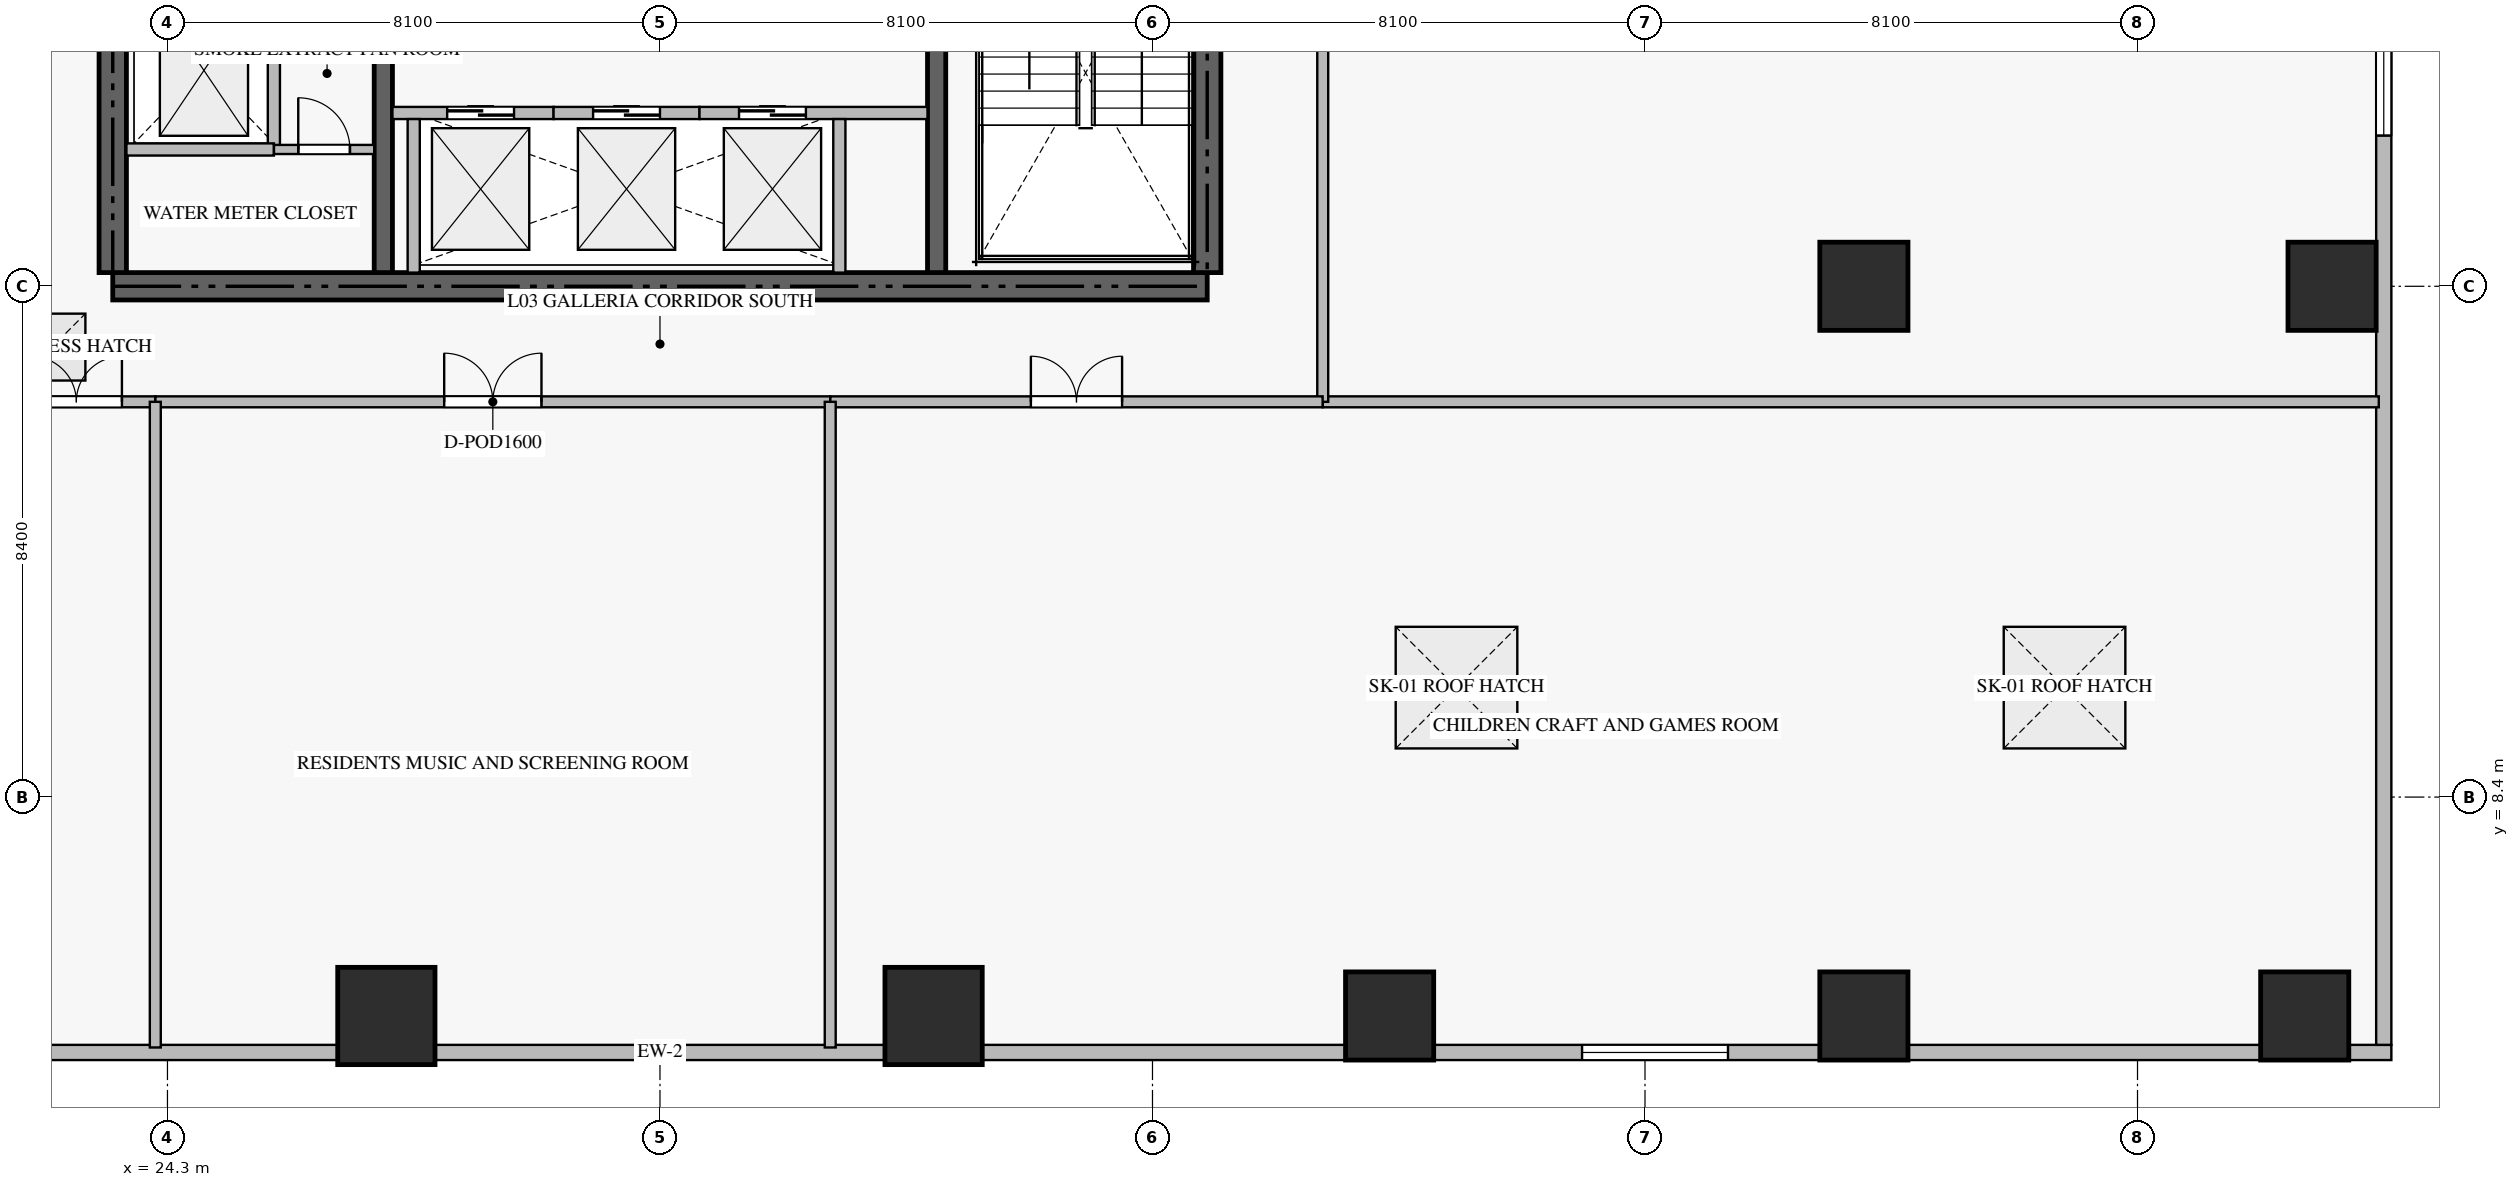
"""IFC4 building model, lengths in metres.
Left out: names, types, materials, properties, quantities, classifications, styles, units other than length and angle.
Written with IfcOpenShell. Run it as: python <this file> out.ifc"""

import sys

from ifc_helpers import new_model, si_unit, direction, frame, frame_2d, origin, origin_2d, place, context, subcontext, project, spatial, rectangle, extrude, source, transform, mapped, element, fill, save


model = new_model("IFC4")
c1 = context("Model", 3, precision=1e-05, world=origin(), true_north=direction((0.0, 1.0)))
c2 = subcontext(c1, "Body", "Model", "MODEL_VIEW")
j1 = project(units=[si_unit("LENGTHUNIT", "METRE"), si_unit("PLANEANGLEUNIT", "RADIAN")], contexts=[c1])
p1 = place(None, origin())
s1 = spatial("IfcSite", under=j1, at=p1, CompositionType="ELEMENT")
p2 = place(p1, origin())
s2 = spatial("IfcBuilding", under=s1, at=p2, CompositionType="ELEMENT")
p3 = place(p2, frame((0.0, 0.0, 15.3)))
s3 = spatial("IfcBuildingStorey", under=s2, at=p3, CompositionType="ELEMENT", Elevation=15.3)
p4 = place(p3, frame((23.4, 16.8, -0.38), z_axis=(0.0, 0.0, 1.0), x_axis=(1.0, 0.0, 0.0)))
e1 = element("IfcWall", 1, at=p4, inside=s3, PredefinedType="SHEAR", context=c2, shape_type="SweptSolid", body=[
    extrude(rectangle(XDim=18.0, YDim=0.45, at=frame_2d((9.0, 0.0))), origin(), (0.0, 0.0, 1.0), 5.228),
])
p5 = place(p3, frame((23.4, 17.025, -0.38), z_axis=(0.0, 0.0, 1.0), x_axis=(0.0, 1.0, 0.0)))
e2 = element("IfcWall", 2, at=p5, inside=s3, PredefinedType="SHEAR", context=c2, shape_type="SweptSolid", body=[
    extrude(rectangle(XDim=4.825, YDim=0.45, at=frame_2d((2.413, 0.0))), origin(), (0.0, 0.0, 1.0), 5.228),
])
p6 = place(p3, frame((41.4, 17.025, -0.38), z_axis=(0.0, 0.0, 1.0), x_axis=(0.0, 1.0, 0.0)))
e3 = element("IfcWall", 3, at=p6, inside=s3, PredefinedType="SHEAR", context=c2, shape_type="SweptSolid", body=[
    extrude(rectangle(XDim=8.325, YDim=0.45, at=frame_2d((4.163, 0.0))), origin(), (0.0, 0.0, 1.0), 5.228),
])
p7 = place(p3, frame((27.85, 17.025, -0.38), z_axis=(0.0, 0.0, 1.0), x_axis=(0.0, 1.0, 0.0)))
e4 = element("IfcWall", 4, at=p7, inside=s3, PredefinedType="SHEAR", context=c2, shape_type="SweptSolid", body=[
    extrude(rectangle(XDim=4.825, YDim=0.3, at=frame_2d((2.413, 0.0))), origin(), (0.0, 0.0, 1.0), 5.228),
])
p8 = place(p3, frame((36.95, 17.025, -0.38), z_axis=(0.0, 0.0, 1.0), x_axis=(0.0, 1.0, 0.0)))
e5 = element("IfcWall", 5, at=p8, inside=s3, PredefinedType="SHEAR", context=c2, shape_type="SweptSolid", body=[
    extrude(rectangle(XDim=8.325, YDim=0.3, at=frame_2d((4.163, 0.0))), origin(), (0.0, 0.0, 1.0), 5.228),
])
m1 = source(origin(), c2, "Body", "SweptSolid", [
    extrude(rectangle(XDim=1.6, YDim=1.6, at=origin_2d()), origin(), (0.0, 0.0, 1.0), 5.23),
])
for number, where, z_axis, x_axis in (
    (6, (27.9, 4.8, -0.38), (0.0, 0.0, 1.0), (1.0, 0.0, 0.0)),
    (7, (36.9, 4.8, -0.38), (0.0, 0.0, 1.0), (1.0, 0.0, 0.0)),
):
    element("IfcColumn", number, at=place(p3, frame(where, z_axis=z_axis, x_axis=x_axis)), inside=s3, PredefinedType="COLUMN", context=c2, shape_type="MappedRepresentation", body=[
        mapped(m1, transform((0.0, 0.0, 0.0), scale=1.0)),
    ])
m2 = source(origin(), c2, "Body", "SweptSolid", [
    extrude(rectangle(XDim=1.45, YDim=1.45, at=origin_2d()), origin(), (0.0, 0.0, 1.0), 5.23),
])
for number, where, z_axis, x_axis in (
    (8, (44.4, 4.8, -0.38), (0.0, 0.0, 1.0), (1.0, 0.0, 0.0)),
    (9, (52.2, 4.8, -0.38), (0.0, 0.0, 1.0), (1.0, 0.0, 0.0)),
    (10, (52.2, 16.8, -0.38), (0.0, 0.0, 1.0), (1.0, 0.0, 0.0)),
    (11, (59.9, 16.8, -0.38), (0.0, 0.0, 1.0), (1.0, 0.0, 0.0)),
    (12, (59.45, 4.8, -0.38), (0.0, 0.0, 1.0), (1.0, 0.0, 0.0)),
):
    element("IfcColumn", number, at=place(p3, frame(where, z_axis=z_axis, x_axis=x_axis)), inside=s3, PredefinedType="COLUMN", context=c2, shape_type="MappedRepresentation", body=[
        mapped(m2, transform((0.0, 0.0, 0.0), scale=1.0)),
    ])
p9 = place(p3, frame((3.925, 4.2, 0.0), z_axis=(0.0, 0.0, 1.0), x_axis=(1.0, 0.0, 0.0)))
e13 = element("IfcWall", 13, at=p9, inside=s3, PredefinedType="ELEMENTEDWALL", context=c2, shape_type="SweptSolid", body=[
    extrude(rectangle(XDim=56.95, YDim=0.25, at=frame_2d((28.475, 0.0))), origin(), (0.0, 0.0, 1.0), 4.835),
])
p10 = place(p9, frame((10.91, 0.0, 0.6)))
e14 = element("IfcOpeningElement", 14, at=p10, cuts=e13, PredefinedType="OPENING", context=c2, shape_type="SweptSolid", body=[
    extrude(rectangle(XDim=2.4, YDim=2.6, at=frame_2d((1.2, 1.3))), frame((0.0, 0.135, 0.0), z_axis=(0.0, -1.0, 0.0), x_axis=(1.0, 0.0, 0.0)), (0.0, 0.0, 1.0), 0.27),
])
p11 = place(p9, frame((43.64, 0.0, 0.6)))
e15 = element("IfcOpeningElement", 15, at=p11, cuts=e13, PredefinedType="OPENING", context=c2, shape_type="SweptSolid", body=[
    extrude(rectangle(XDim=2.4, YDim=2.6, at=frame_2d((1.2, 1.3))), frame((0.0, 0.135, 0.0), z_axis=(0.0, -1.0, 0.0), x_axis=(1.0, 0.0, 0.0)), (0.0, 0.0, 1.0), 0.27),
])
p12 = place(p3, frame((60.75, 4.325, 0.0), z_axis=(0.0, 0.0, 1.0), x_axis=(0.0, 1.0, 0.0)))
e16 = element("IfcWall", 16, at=p12, inside=s3, PredefinedType="ELEMENTEDWALL", context=c2, shape_type="SweptSolid", body=[
    extrude(rectangle(XDim=41.75, YDim=0.25, at=frame_2d((20.875, 0.0))), origin(), (0.0, 0.0, 1.0), 4.835),
])
p13 = place(p12, frame((14.953, 0.0, 0.6)))
e17 = element("IfcOpeningElement", 17, at=p13, cuts=e16, PredefinedType="OPENING", context=c2, shape_type="SweptSolid", body=[
    extrude(rectangle(XDim=2.4, YDim=2.6, at=frame_2d((1.2, 1.3))), frame((0.0, 0.135, 0.0), z_axis=(0.0, -1.0, 0.0), x_axis=(1.0, 0.0, 0.0)), (0.0, 0.0, 1.0), 0.27),
])
p14 = place(p12, frame((24.397, 0.0, 0.6)))
e18 = element("IfcOpeningElement", 18, at=p14, cuts=e16, PredefinedType="OPENING", context=c2, shape_type="SweptSolid", body=[
    extrude(rectangle(XDim=2.4, YDim=2.6, at=frame_2d((1.2, 1.3))), frame((0.0, 0.135, 0.0), z_axis=(0.0, -1.0, 0.0), x_axis=(1.0, 0.0, 0.0)), (0.0, 0.0, 1.0), 0.27),
])
p15 = place(p3, frame((28.0, 19.65, 0.0), z_axis=(0.0, 0.0, 1.0), x_axis=(1.0, 0.0, 0.0)))
e19 = element("IfcWall", 19, at=p15, inside=s3, PredefinedType="STANDARD", context=c2, shape_type="SweptSolid", body=[
    extrude(rectangle(XDim=2.65, YDim=0.2, at=frame_2d((1.325, 0.0))), origin(), (0.0, 0.0, 1.0), 4.85),
])
p16 = place(p15, frame((0.9, 0.0, 0.0)))
e20 = element("IfcOpeningElement", 20, at=p16, cuts=e19, PredefinedType="OPENING", context=c2, shape_type="SweptSolid", body=[
    extrude(rectangle(XDim=1.1, YDim=2.2, at=frame_2d((0.55, 1.1))), frame((0.0, 0.11, 0.0), z_axis=(0.0, -1.0, 0.0), x_axis=(1.0, 0.0, 0.0)), (0.0, 0.0, 1.0), 0.22),
])
p17 = place(p3, frame((28.35, 17.025, 0.0), z_axis=(0.0, 0.0, 1.0), x_axis=(0.0, 1.0, 0.0)))
e21 = element("IfcWall", 21, at=p17, inside=s3, PredefinedType="STANDARD", context=c2, shape_type="SweptSolid", body=[
    extrude(rectangle(XDim=2.525, YDim=0.2, at=frame_2d((1.263, 0.0))), origin(), (0.0, 0.0, 1.0), 4.85),
])
p18 = place(p3, frame((30.65, 19.65, 0.0), z_axis=(0.0, 0.0, 1.0), x_axis=(1.0, 0.0, 0.0)))
e22 = element("IfcWall", 22, at=p18, inside=s3, PredefinedType="STANDARD", context=c2, shape_type="SweptSolid", body=[
    extrude(rectangle(XDim=2.4, YDim=0.2, at=frame_2d((1.2, 0.0))), origin(), (0.0, 0.0, 1.0), 4.85),
])
p19 = place(p18, frame((0.65, 0.0, 0.0)))
e23 = element("IfcOpeningElement", 23, at=p19, cuts=e22, PredefinedType="OPENING", context=c2, shape_type="SweptSolid", body=[
    extrude(rectangle(XDim=1.1, YDim=2.2, at=frame_2d((0.55, 1.1))), frame((0.0, 0.11, 0.0), z_axis=(0.0, -1.0, 0.0), x_axis=(1.0, 0.0, 0.0)), (0.0, 0.0, 1.0), 0.22),
])
p20 = place(p3, frame((33.05, 19.65, 0.0), z_axis=(0.0, 0.0, 1.0), x_axis=(1.0, 0.0, 0.0)))
e24 = element("IfcWall", 24, at=p20, inside=s3, PredefinedType="STANDARD", context=c2, shape_type="SweptSolid", body=[
    extrude(rectangle(XDim=3.75, YDim=0.2, at=frame_2d((1.875, 0.0))), origin(), (0.0, 0.0, 1.0), 4.85),
])
p21 = place(p20, frame((0.65, 0.0, 0.0)))
e25 = element("IfcOpeningElement", 25, at=p21, cuts=e24, PredefinedType="OPENING", context=c2, shape_type="SweptSolid", body=[
    extrude(rectangle(XDim=1.1, YDim=2.2, at=frame_2d((0.55, 1.1))), frame((0.0, 0.11, 0.0), z_axis=(0.0, -1.0, 0.0), x_axis=(1.0, 0.0, 0.0)), (0.0, 0.0, 1.0), 0.22),
])
p22 = place(p3, frame((35.35, 17.025, 0.0), z_axis=(0.0, 0.0, 1.0), x_axis=(0.0, 1.0, 0.0)))
e26 = element("IfcWall", 26, at=p22, inside=s3, PredefinedType="STANDARD", context=c2, shape_type="SweptSolid", body=[
    extrude(rectangle(XDim=2.525, YDim=0.2, at=frame_2d((1.263, 0.0))), origin(), (0.0, 0.0, 1.0), 4.85),
])
p23 = place(p3, frame((26.05, 19.05, 0.0), z_axis=(0.0, 0.0, 1.0), x_axis=(0.0, 1.0, 0.0)))
e27 = element("IfcWall", 27, at=p23, inside=s3, PredefinedType="STANDARD", context=c2, shape_type="SweptSolid", body=[
    extrude(rectangle(XDim=2.5, YDim=0.2, at=frame_2d((1.25, 0.0))), origin(), (0.0, 0.0, 1.0), 4.85),
])
p24 = place(p3, frame((23.625, 19.05, 0.0), z_axis=(0.0, 0.0, 1.0), x_axis=(1.0, 0.0, 0.0)))
e28 = element("IfcWall", 28, at=p24, inside=s3, PredefinedType="STANDARD", context=c2, shape_type="SweptSolid", body=[
    extrude(rectangle(XDim=2.425, YDim=0.2, at=frame_2d((1.212, 0.0))), origin(), (0.0, 0.0, 1.0), 4.85),
])
p25 = place(p3, frame((26.052, 19.05, 0.0), z_axis=(0.0, 0.0, 1.0), x_axis=(1.0, 0.0, 0.0)))
e29 = element("IfcWall", 29, at=p25, inside=s3, PredefinedType="PARTITIONING", context=c2, shape_type="SweptSolid", body=[
    extrude(rectangle(XDim=1.648, YDim=0.15, at=frame_2d((0.824, 0.0))), origin(), (0.0, 0.0, 1.0), 4.85),
])
p26 = place(p25, frame((0.399, 0.0, 0.0)))
e30 = element("IfcOpeningElement", 30, at=p26, cuts=e29, PredefinedType="OPENING", context=c2, shape_type="SweptSolid", body=[
    extrude(rectangle(XDim=0.85, YDim=2.1, at=frame_2d((0.425, 1.05))), frame((0.0, 0.085, 0.0), z_axis=(0.0, -1.0, 0.0), x_axis=(1.0, 0.0, 0.0)), (0.0, 0.0, 1.0), 0.17),
])
p27 = place(p3, frame((43.3, 14.9, 0.0), z_axis=(0.0, 0.0, 1.0), x_axis=(1.0, 0.0, 0.0)))
e31 = element("IfcWall", 31, at=p27, inside=s3, PredefinedType="PARTITIONING", context=c2, shape_type="SweptSolid", body=[
    extrude(rectangle(XDim=17.368, YDim=0.18, at=frame_2d((8.684, 0.0))), origin(), (0.0, 0.0, 1.0), 4.85),
])
p28 = place(p3, frame((43.3, 14.9, 0.0), z_axis=(0.0, 0.0, 1.0), x_axis=(0.0, 1.0, 0.0)))
e32 = element("IfcWall", 32, at=p28, inside=s3, PredefinedType="PARTITIONING", context=c2, shape_type="SweptSolid", body=[
    extrude(rectangle(XDim=18.18, YDim=0.18, at=frame_2d((9.09, 0.0))), origin(), (0.0, 0.0, 1.0), 4.85),
])
p29 = place(p28, frame((8.34, 0.0, 0.0)))
e33 = element("IfcOpeningElement", 33, at=p29, cuts=e32, PredefinedType="OPENING", context=c2, shape_type="SweptSolid", body=[
    extrude(rectangle(XDim=1.5, YDim=2.25, at=frame_2d((0.75, 1.125))), frame((0.0, 0.1, 0.0), z_axis=(0.0, -1.0, 0.0), x_axis=(1.0, 0.0, 0.0)), (0.0, 0.0, 1.0), 0.2),
])
p30 = place(p3, frame((21.502, 14.9, 0.0), z_axis=(0.0, 0.0, 1.0), x_axis=(1.0, 0.0, 0.0)))
e34 = element("IfcWall", 34, at=p30, inside=s3, PredefinedType="PARTITIONING", context=c2, shape_type="SweptSolid", body=[
    extrude(rectangle(XDim=2.598, YDim=0.18, at=frame_2d((1.299, 0.0))), origin(), (0.0, 0.0, 1.0), 4.85),
])
p31 = place(p30, frame((0.549, 0.0, 0.0)))
e35 = element("IfcOpeningElement", 35, at=p31, cuts=e34, PredefinedType="OPENING", context=c2, shape_type="SweptSolid", body=[
    extrude(rectangle(XDim=1.5, YDim=2.25, at=frame_2d((0.75, 1.125))), frame((0.0, 0.1, 0.0), z_axis=(0.0, -1.0, 0.0), x_axis=(1.0, 0.0, 0.0)), (0.0, 0.0, 1.0), 0.2),
])
p32 = place(p3, frame((24.102, 14.9, 0.0), z_axis=(0.0, 0.0, 1.0), x_axis=(1.0, 0.0, 0.0)))
e36 = element("IfcWall", 36, at=p32, inside=s3, PredefinedType="PARTITIONING", context=c2, shape_type="SweptSolid", body=[
    extrude(rectangle(XDim=11.098, YDim=0.18, at=frame_2d((5.549, 0.0))), origin(), (0.0, 0.0, 1.0), 4.85),
])
p33 = place(p32, frame((4.749, 0.0, 0.0)))
e37 = element("IfcOpeningElement", 37, at=p33, cuts=e36, PredefinedType="OPENING", context=c2, shape_type="SweptSolid", body=[
    extrude(rectangle(XDim=1.6, YDim=2.3, at=frame_2d((0.8, 1.15))), frame((0.0, 0.1, 0.0), z_axis=(0.0, -1.0, 0.0), x_axis=(1.0, 0.0, 0.0)), (0.0, 0.0, 1.0), 0.2),
])
p34 = place(p3, frame((35.202, 14.9, 0.0), z_axis=(0.0, 0.0, 1.0), x_axis=(1.0, 0.0, 0.0)))
e38 = element("IfcWall", 38, at=p34, inside=s3, PredefinedType="PARTITIONING", context=c2, shape_type="SweptSolid", body=[
    extrude(rectangle(XDim=8.096, YDim=0.18, at=frame_2d((4.048, 0.0))), origin(), (0.0, 0.0, 1.0), 4.85),
])
p35 = place(p34, frame((3.298, 0.0, 0.0)))
e39 = element("IfcOpeningElement", 39, at=p35, cuts=e38, PredefinedType="OPENING", context=c2, shape_type="SweptSolid", body=[
    extrude(rectangle(XDim=1.5, YDim=2.25, at=frame_2d((0.75, 1.125))), frame((0.0, 0.1, 0.0), z_axis=(0.0, -1.0, 0.0), x_axis=(1.0, 0.0, 0.0)), (0.0, 0.0, 1.0), 0.2),
])
for number, where, z_axis, x_axis in (
    (40, (24.1, 4.282, 0.0), (0.0, 0.0, 1.0), (0.0, 1.0, 0.0)),
    (41, (35.2, 4.282, 0.0), (0.0, 0.0, 1.0), (0.0, 1.0, 0.0)),
):
    element("IfcWall", number, at=place(p3, frame(where, z_axis=z_axis, x_axis=x_axis)), inside=s3, PredefinedType="PARTITIONING", context=c2, shape_type="SweptSolid", body=[
        extrude(rectangle(XDim=10.618, YDim=0.18, at=frame_2d((5.309, 0.0))), origin(), (0.0, 0.0, 1.0), 4.85),
    ])
m3 = source(origin(), c2, "Body", "SweptSolid", [
    extrude(rectangle(XDim=2.4, YDim=2.6, at=frame_2d((1.2, 1.3))), frame((0.0, 0.03, 0.0), z_axis=(0.0, -1.0, 0.0), x_axis=(1.0, 0.0, 0.0)), (0.0, 0.0, 1.0), 0.06),
])
p36 = place(p11, origin())
e42 = element("IfcWindow", 42, at=p36, inside=s3, PartitioningType="SINGLE_PANEL", PredefinedType="WINDOW", context=c2, shape_type="MappedRepresentation", body=[
    mapped(m3, transform((0.0, 0.0, 0.0), scale=1.0)),
])
fill(e15, e42)
p37 = place(p13, origin())
e43 = element("IfcWindow", 43, at=p37, inside=s3, PartitioningType="SINGLE_PANEL", PredefinedType="WINDOW", context=c2, shape_type="MappedRepresentation", body=[
    mapped(m3, transform((0.0, 0.0, 0.0), scale=1.0)),
])
fill(e17, e43)
p38 = place(p3, frame((0.0, 0.0, -0.38)))
p39 = place(p38, frame((45.5, 10.2, 0.0)))
p40 = place(p39, frame((0.0, 0.0, 0.34)))
e44 = element("IfcWindow", 44, at=p40, inside=s3, PartitioningType="SINGLE_PANEL", PredefinedType="SKYLIGHT", context=c2, shape_type="SweptSolid", body=[
    extrude(rectangle(XDim=2.0, YDim=2.0, at=origin_2d()), origin(), (0.0, 0.0, 1.0), 0.04),
])
p41 = place(p38, frame((55.5, 10.2, 0.0)))
p42 = place(p41, frame((0.0, 0.0, 0.34)))
e45 = element("IfcWindow", 45, at=p42, inside=s3, PartitioningType="SINGLE_PANEL", PredefinedType="SKYLIGHT", context=c2, shape_type="SweptSolid", body=[
    extrude(rectangle(XDim=2.0, YDim=2.0, at=origin_2d()), origin(), (0.0, 0.0, 1.0), 0.04),
])
p43 = place(p2, frame((0.0, 0.0, 21.0)))
p44 = place(p43, frame((0.0, 0.0, -0.85)))
p45 = place(p44, frame((22.4, 15.8, 0.0)))
p46 = place(p45, frame((0.0, 0.0, 0.81)))
e46 = element("IfcDoor", 46, at=p46, inside=s3, OperationType="SINGLE_SWING_LEFT", PredefinedType="TRAPDOOR", context=c2, shape_type="SweptSolid", body=[
    extrude(rectangle(XDim=1.1, YDim=1.1, at=origin_2d()), origin(), (0.0, 0.0, 1.0), 0.04),
])
m4 = source(origin(), c2, "Body", "SweptSolid", [
    extrude(rectangle(XDim=1.1, YDim=2.2, at=frame_2d((0.55, 1.1))), frame((0.0, 0.025, 0.0), z_axis=(0.0, -1.0, 0.0), x_axis=(1.0, 0.0, 0.0)), (0.0, 0.0, 1.0), 0.05),
])
p47 = place(p16, origin())
e47 = element("IfcDoor", 47, at=p47, inside=s3, OperationType="DOUBLE_DOOR_SLIDING", PredefinedType="DOOR", context=c2, shape_type="MappedRepresentation", body=[
    mapped(m4, transform((0.0, 0.0, 0.0), scale=1.0)),
])
fill(e20, e47)
p48 = place(p19, origin())
e48 = element("IfcDoor", 48, at=p48, inside=s3, OperationType="DOUBLE_DOOR_SLIDING", PredefinedType="DOOR", context=c2, shape_type="MappedRepresentation", body=[
    mapped(m4, transform((0.0, 0.0, 0.0), scale=1.0)),
])
fill(e23, e48)
p49 = place(p21, origin())
e49 = element("IfcDoor", 49, at=p49, inside=s3, OperationType="DOUBLE_DOOR_SLIDING", PredefinedType="DOOR", context=c2, shape_type="MappedRepresentation", body=[
    mapped(m4, transform((0.0, 0.0, 0.0), scale=1.0)),
])
fill(e25, e49)
m5 = source(origin(), c2, "Body", "SweptSolid", [
    extrude(rectangle(XDim=0.85, YDim=2.1, at=frame_2d((0.425, 1.05))), frame((0.0, 0.025, 0.0), z_axis=(0.0, -1.0, 0.0), x_axis=(1.0, 0.0, 0.0)), (0.0, 0.0, 1.0), 0.05),
])
p50 = place(p26, origin())
e50 = element("IfcDoor", 50, at=p50, inside=s3, OperationType="SINGLE_SWING_LEFT", PredefinedType="DOOR", context=c2, shape_type="MappedRepresentation", body=[
    mapped(m5, transform((0.0, 0.0, 0.0), scale=1.0)),
])
fill(e30, e50)
m6 = source(origin(), c2, "Body", "SweptSolid", [
    extrude(rectangle(XDim=1.5, YDim=2.25, at=frame_2d((0.75, 1.125))), frame((0.0, 0.025, 0.0), z_axis=(0.0, -1.0, 0.0), x_axis=(1.0, 0.0, 0.0)), (0.0, 0.0, 1.0), 0.05),
])
p51 = place(p31, origin())
e51 = element("IfcDoor", 51, at=p51, inside=s3, OperationType="DOUBLE_DOOR_SINGLE_SWING", PredefinedType="DOOR", context=c2, shape_type="MappedRepresentation", body=[
    mapped(m6, transform((0.0, 0.0, 0.0), scale=1.0)),
])
fill(e35, e51)
m7 = source(origin(), c2, "Body", "SweptSolid", [
    extrude(rectangle(XDim=1.6, YDim=2.3, at=frame_2d((0.8, 1.15))), frame((0.0, 0.025, 0.0), z_axis=(0.0, -1.0, 0.0), x_axis=(1.0, 0.0, 0.0)), (0.0, 0.0, 1.0), 0.05),
])
p52 = place(p33, origin())
e52 = element("IfcDoor", 52, at=p52, inside=s3, OperationType="DOUBLE_DOOR_SINGLE_SWING", PredefinedType="DOOR", context=c2, shape_type="MappedRepresentation", body=[
    mapped(m7, transform((0.0, 0.0, 0.0), scale=1.0)),
])
fill(e37, e52)
p53 = place(p35, origin())
e53 = element("IfcDoor", 53, at=p53, inside=s3, OperationType="DOUBLE_DOOR_SINGLE_SWING", PredefinedType="DOOR", context=c2, shape_type="MappedRepresentation", body=[
    mapped(m6, transform((0.0, 0.0, 0.0), scale=1.0)),
])
fill(e39, e53)
save(model, sys.argv[1])
